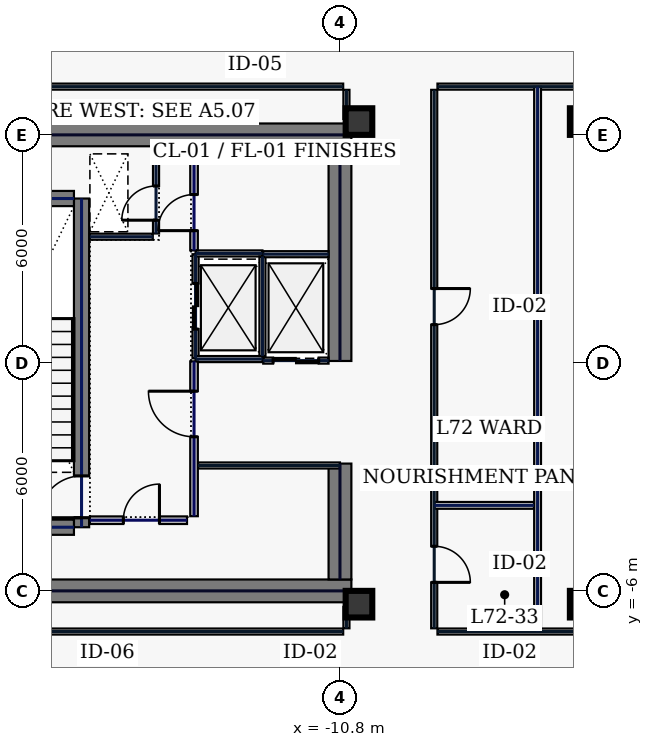
"""IFC4 building model, lengths in metres.
Left out: names, types, materials, properties, quantities, classifications, styles, units other than length and angle.
Written with IfcOpenShell. Run it as: python <this file> out.ifc"""

import sys

from ifc_helpers import new_model, si_unit, direction, frame, frame_2d, origin, origin_2d, place, context, subcontext, project, spatial, rectangle, hollow_rectangle, extrude, element, fill, save


model = new_model("IFC4")
c1 = context("Model", 3, precision=1e-05, world=origin(), true_north=direction((0.0, 1.0)))
c2 = subcontext(c1, "Body", "Model", "MODEL_VIEW")
j1 = project(units=[si_unit("LENGTHUNIT", "METRE"), si_unit("PLANEANGLEUNIT", "RADIAN")], contexts=[c1])
p1 = place(None, origin())
s1 = spatial("IfcSite", under=j1, at=p1, CompositionType="ELEMENT")
p2 = place(p1, origin())
s2 = spatial("IfcBuilding", under=s1, at=p2, CompositionType="ELEMENT")
p3 = place(p2, frame((0.0, 0.0, 309.0)))
s3 = spatial("IfcBuildingStorey", under=s2, at=p3, CompositionType="ELEMENT", Elevation=309.0)
for number, where, z_axis, x_axis in (
    (1, (-22.0, 6.0, 0.0), (0.0, 0.0, 1.0), (1.0, 0.0, 0.0)),
    (2, (-22.0, -6.0, 0.0), (0.0, 0.0, 1.0), (1.0, 0.0, 0.0)),
):
    element("IfcWall", number, at=place(p3, frame(where, z_axis=z_axis, x_axis=x_axis)), inside=s3, PredefinedType="SHEAR", context=c2, shape_type="SweptSolid", body=[
        extrude(rectangle(XDim=11.5, YDim=0.6, at=frame_2d((5.75, 0.0))), origin(), (0.0, 0.0, 1.0), 3.74),
    ])
p4 = place(p3, frame((-10.8, -5.7, 0.0), z_axis=(0.0, 0.0, 1.0), x_axis=(0.0, 1.0, 0.0)))
e3 = element("IfcWall", 3, at=p4, inside=s3, PredefinedType="SHEAR", context=c2, shape_type="SweptSolid", body=[
    extrude(rectangle(XDim=3.05, YDim=0.6, at=frame_2d((1.525, 0.0))), origin(), (0.0, 0.0, 1.0), 3.74),
])
p5 = place(p3, frame((-10.8, 0.05, 0.0), z_axis=(0.0, 0.0, 1.0), x_axis=(0.0, 1.0, 0.0)))
e4 = element("IfcWall", 4, at=p5, inside=s3, PredefinedType="SHEAR", context=c2, shape_type="SweptSolid", body=[
    extrude(rectangle(XDim=5.65, YDim=0.6, at=frame_2d((2.825, 0.0))), origin(), (0.0, 0.0, 1.0), 3.74),
])
p6 = place(p3, frame((-17.6, -4.325, 0.0), z_axis=(0.0, 0.0, 1.0), x_axis=(0.0, 1.0, 0.0)))
e5 = element("IfcWall", 5, at=p6, inside=s3, PredefinedType="SHEAR", context=c2, shape_type="SweptSolid", body=[
    extrude(rectangle(XDim=8.65, YDim=0.4, at=frame_2d((4.325, 0.0))), origin(), (0.0, 0.0, 1.0), 3.74),
])
p7 = place(p6, frame((0.25, 0.0, 0.0)))
e6 = element("IfcOpeningElement", 6, at=p7, cuts=e5, PredefinedType="OPENING", context=c2, shape_type="SweptSolid", body=[
    extrude(rectangle(XDim=1.1, YDim=2.2, at=frame_2d((0.55, 1.1))), frame((0.0, 0.21, 0.0), z_axis=(0.0, -1.0, 0.0), x_axis=(1.0, 0.0, 0.0)), (0.0, 0.0, 1.0), 0.42),
])
for number, where, z_axis, x_axis in (
    (7, (-21.2, -4.325, 0.0), (0.0, 0.0, 1.0), (1.0, 0.0, 0.0)),
    (8, (-21.2, 4.325, 0.0), (0.0, 0.0, 1.0), (1.0, 0.0, 0.0)),
):
    element("IfcWall", number, at=place(p3, frame(where, z_axis=z_axis, x_axis=x_axis)), inside=s3, PredefinedType="SHEAR", context=c2, shape_type="SweptSolid", body=[
        extrude(rectangle(XDim=3.4, YDim=0.4, at=frame_2d((1.7, 0.0))), origin(), (0.0, 0.0, 1.0), 3.74),
    ])
for number, where, z_axis, x_axis in (
    (9, (-10.3, -6.35, 0.0), (0.0, 0.0, 1.0), (1.0, 0.0, 0.0)),
    (10, (-10.3, 6.35, 0.0), (0.0, 0.0, 1.0), (1.0, 0.0, 0.0)),
    (11, (-4.4, -6.35, 0.0), (0.0, 0.0, 1.0), (1.0, 0.0, 0.0)),
    (12, (-4.4, 6.35, 0.0), (0.0, 0.0, 1.0), (1.0, 0.0, 0.0)),
):
    element("IfcColumn", number, at=place(p3, frame(where, z_axis=z_axis, x_axis=x_axis)), inside=s3, PredefinedType="COLUMN", context=c2, shape_type="SweptSolid", body=[
        extrude(hollow_rectangle(XDim=0.7, YDim=0.7, WallThickness=0.032, at=origin_2d()), origin(), (0.0, 0.0, 1.0), 3.74),
    ])
p8 = place(p3, frame((-14.6, 0.12, 0.0), z_axis=(0.0, 0.0, 1.0), x_axis=(0.0, 1.0, 0.0)))
e13 = element("IfcWall", 13, at=p8, inside=s3, PredefinedType="PARTITIONING", context=c2, shape_type="SweptSolid", body=[
    extrude(rectangle(XDim=2.74, YDim=0.16, at=frame_2d((1.37, 0.0))), origin(), (0.0, 0.0, 1.0), 3.74),
])
p9 = place(p8, frame((0.77, 0.0, 0.0)))
e14 = element("IfcOpeningElement", 14, at=p9, cuts=e13, PredefinedType="OPENING", context=c2, shape_type="SweptSolid", body=[
    extrude(rectangle(XDim=1.2, YDim=2.2, at=frame_2d((0.6, 1.1))), frame((0.0, 0.09, 0.0), z_axis=(0.0, -1.0, 0.0), x_axis=(1.0, 0.0, 0.0)), (0.0, 0.0, 1.0), 0.18),
])
for number, where, z_axis, x_axis in (
    (15, (-14.6, 0.1, 0.0), (0.0, 0.0, 1.0), (1.0, 0.0, 0.0)),
    (16, (-14.6, 2.88, 0.0), (0.0, 0.0, 1.0), (1.0, 0.0, 0.0)),
):
    element("IfcWall", number, at=place(p3, frame(where, z_axis=z_axis, x_axis=x_axis)), inside=s3, PredefinedType="PARTITIONING", context=c2, shape_type="SweptSolid", body=[
        extrude(rectangle(XDim=1.76, YDim=0.16, at=frame_2d((0.88, 0.0))), origin(), (0.0, 0.0, 1.0), 3.74),
    ])
p10 = place(p3, frame((-12.84, 0.18, 0.0), z_axis=(0.0, 0.0, 1.0), x_axis=(0.0, 1.0, 0.0)))
e17 = element("IfcWall", 17, at=p10, inside=s3, PredefinedType="PARTITIONING", context=c2, shape_type="SweptSolid", body=[
    extrude(rectangle(XDim=2.62, YDim=0.16, at=frame_2d((1.31, 0.0))), origin(), (0.0, 0.0, 1.0), 3.74),
])
p11 = place(p3, frame((-12.82, 0.06, 0.0), z_axis=(0.0, 0.0, 1.0), x_axis=(1.0, 0.0, 0.0)))
e18 = element("IfcWall", 18, at=p11, inside=s3, PredefinedType="PARTITIONING", context=c2, shape_type="SweptSolid", body=[
    extrude(rectangle(XDim=1.72, YDim=0.16, at=frame_2d((0.86, 0.0))), origin(), (0.0, 0.0, 1.0), 3.74),
])
p12 = place(p11, frame((0.26, 0.0, 0.0)))
e19 = element("IfcOpeningElement", 19, at=p12, cuts=e18, PredefinedType="OPENING", context=c2, shape_type="SweptSolid", body=[
    extrude(rectangle(XDim=1.2, YDim=2.2, at=frame_2d((0.6, 1.1))), frame((0.0, 0.09, 0.0), z_axis=(0.0, -1.0, 0.0), x_axis=(1.0, 0.0, 0.0)), (0.0, 0.0, 1.0), 0.18),
])
p13 = place(p3, frame((-12.82, 2.86, 0.0), z_axis=(0.0, 0.0, 1.0), x_axis=(1.0, 0.0, 0.0)))
e20 = element("IfcWall", 20, at=p13, inside=s3, PredefinedType="PARTITIONING", context=c2, shape_type="SweptSolid", body=[
    extrude(rectangle(XDim=1.72, YDim=0.16, at=frame_2d((0.86, 0.0))), origin(), (0.0, 0.0, 1.0), 3.74),
])
p14 = place(p3, frame((-15.64, 3.405, 0.0), z_axis=(0.0, 0.0, 1.0), x_axis=(0.0, 1.0, 0.0)))
e21 = element("IfcWall", 21, at=p14, inside=s3, PredefinedType="PARTITIONING", context=c2, shape_type="SweptSolid", body=[
    extrude(rectangle(XDim=2.155, YDim=0.16, at=frame_2d((1.078, 0.0))), origin(), (0.0, 0.0, 1.0), 3.74),
])
p15 = place(p14, frame((0.35, 0.0, 0.0)))
e22 = element("IfcOpeningElement", 22, at=p15, cuts=e21, PredefinedType="OPENING", context=c2, shape_type="SweptSolid", body=[
    extrude(rectangle(XDim=0.9, YDim=2.2, at=frame_2d((0.45, 1.1))), frame((0.0, 0.09, 0.0), z_axis=(0.0, -1.0, 0.0), x_axis=(1.0, 0.0, 0.0)), (0.0, 0.0, 1.0), 0.18),
])
p16 = place(p3, frame((-17.38, 3.32, 0.0), z_axis=(0.0, 0.0, 1.0), x_axis=(1.0, 0.0, 0.0)))
e23 = element("IfcWall", 23, at=p16, inside=s3, PredefinedType="PARTITIONING", context=c2, shape_type="SweptSolid", body=[
    extrude(rectangle(XDim=1.655, YDim=0.16, at=frame_2d((0.827, 0.0))), origin(), (0.0, 0.0, 1.0), 3.74),
])
p17 = place(p3, frame((-17.38, -4.14, 0.0), z_axis=(0.0, 0.0, 1.0), x_axis=(1.0, 0.0, 0.0)))
e24 = element("IfcWall", 24, at=p17, inside=s3, PredefinedType="SOLIDWALL", context=c2, shape_type="SweptSolid", body=[
    extrude(rectangle(XDim=2.555, YDim=0.2, at=frame_2d((1.277, 0.0))), origin(), (0.0, 0.0, 1.0), 3.74),
])
p18 = place(p17, frame((0.88, 0.0, 0.0)))
e25 = element("IfcOpeningElement", 25, at=p18, cuts=e24, PredefinedType="OPENING", context=c2, shape_type="SweptSolid", body=[
    extrude(rectangle(XDim=0.95, YDim=2.2, at=frame_2d((0.475, 1.1))), frame((0.0, 0.11, 0.0), z_axis=(0.0, -1.0, 0.0), x_axis=(1.0, 0.0, 0.0)), (0.0, 0.0, 1.0), 0.22),
])
p19 = place(p3, frame((-14.535, -2.7, 0.0), z_axis=(0.0, 0.0, 1.0), x_axis=(1.0, 0.0, 0.0)))
e26 = element("IfcWall", 26, at=p19, inside=s3, PredefinedType="PARTITIONING", context=c2, shape_type="SweptSolid", body=[
    extrude(rectangle(XDim=3.735, YDim=0.16, at=frame_2d((1.867, 0.0))), origin(), (0.0, 0.0, 1.0), 3.74),
])
p20 = place(p3, frame((-14.64, 2.96, 0.0), z_axis=(0.0, 0.0, 1.0), x_axis=(0.0, 1.0, 0.0)))
e27 = element("IfcWall", 27, at=p20, inside=s3, PredefinedType="SOLIDWALL", context=c2, shape_type="SweptSolid", body=[
    extrude(rectangle(XDim=2.6, YDim=0.2, at=frame_2d((1.3, 0.0))), origin(), (0.0, 0.0, 1.0), 3.74),
])
p21 = place(p20, frame((0.52, 0.0, 0.0)))
e28 = element("IfcOpeningElement", 28, at=p21, cuts=e27, PredefinedType="OPENING", context=c2, shape_type="SweptSolid", body=[
    extrude(rectangle(XDim=0.95, YDim=2.2, at=frame_2d((0.475, 1.1))), frame((0.0, 0.11, 0.0), z_axis=(0.0, -1.0, 0.0), x_axis=(1.0, 0.0, 0.0)), (0.0, 0.0, 1.0), 0.22),
])
p22 = place(p3, frame((-14.64, -4.035, 0.0), z_axis=(0.0, 0.0, 1.0), x_axis=(0.0, 1.0, 0.0)))
e29 = element("IfcWall", 29, at=p22, inside=s3, PredefinedType="SOLIDWALL", context=c2, shape_type="SweptSolid", body=[
    extrude(rectangle(XDim=4.075, YDim=0.2, at=frame_2d((2.038, 0.0))), origin(), (0.0, 0.0, 1.0), 3.74),
])
p23 = place(p22, frame((2.09, 0.0, 0.0)))
e30 = element("IfcOpeningElement", 30, at=p23, cuts=e29, PredefinedType="OPENING", context=c2, shape_type="SweptSolid", body=[
    extrude(rectangle(XDim=1.2, YDim=2.2, at=frame_2d((0.6, 1.1))), frame((0.0, 0.11, 0.0), z_axis=(0.0, -1.0, 0.0), x_axis=(1.0, 0.0, 0.0)), (0.0, 0.0, 1.0), 0.22),
])
p24 = place(p3, frame((-3.965, 7.27, 0.0), z_axis=(0.0, 0.0, 1.0), x_axis=(-1.0, 0.0, 0.0)))
e31 = element("IfcWall", 31, at=p24, inside=s3, PredefinedType="PARTITIONING", context=c2, shape_type="SweptSolid", body=[
    extrude(rectangle(XDim=4.27, YDim=0.16, at=frame_2d((2.135, 0.0))), origin(), (0.0, 0.0, 1.0), 3.74),
])
p25 = place(p3, frame((-8.32, 7.185, 0.0), z_axis=(0.0, 0.0, 1.0), x_axis=(0.0, -1.0, 0.0)))
e32 = element("IfcWall", 32, at=p25, inside=s3, PredefinedType="PARTITIONING", context=c2, shape_type="SweptSolid", body=[
    extrude(rectangle(XDim=14.17, YDim=0.16, at=frame_2d((7.085, 0.0))), origin(), (0.0, 0.0, 1.0), 3.74),
])
p26 = place(p25, frame((12.011, 0.0, 0.0)))
e33 = element("IfcOpeningElement", 33, at=p26, cuts=e32, PredefinedType="OPENING", context=c2, shape_type="SweptSolid", body=[
    extrude(rectangle(XDim=0.95, YDim=2.2, at=frame_2d((0.475, 1.1))), frame((0.0, 0.09, 0.0), z_axis=(0.0, -1.0, 0.0), x_axis=(1.0, 0.0, 0.0)), (0.0, 0.0, 1.0), 0.18),
])
p27 = place(p25, frame((5.229, 0.0, 0.0)))
e34 = element("IfcOpeningElement", 34, at=p27, cuts=e32, PredefinedType="OPENING", context=c2, shape_type="SweptSolid", body=[
    extrude(rectangle(XDim=0.95, YDim=2.2, at=frame_2d((0.475, 1.1))), frame((0.0, 0.09, 0.0), z_axis=(0.0, -1.0, 0.0), x_axis=(1.0, 0.0, 0.0)), (0.0, 0.0, 1.0), 0.18),
])
p28 = place(p3, frame((-8.235, -7.07, 0.0), z_axis=(0.0, 0.0, 1.0), x_axis=(1.0, 0.0, 0.0)))
e35 = element("IfcWall", 35, at=p28, inside=s3, PredefinedType="PARTITIONING", context=c2, shape_type="SweptSolid", body=[
    extrude(rectangle(XDim=4.27, YDim=0.16, at=frame_2d((2.135, 0.0))), origin(), (0.0, 0.0, 1.0), 3.74),
])
p29 = place(p3, frame((-10.63, -6.985, 0.0), z_axis=(0.0, 0.0, 1.0), x_axis=(0.0, 1.0, 0.0)))
e36 = element("IfcWall", 36, at=p29, inside=s3, PredefinedType="PARTITIONING", context=c2, shape_type="SweptSolid", body=[
    extrude(rectangle(XDim=0.565, YDim=0.16, at=frame_2d((0.283, 0.0))), origin(), (0.0, 0.0, 1.0), 3.74),
])
p30 = place(p3, frame((-10.63, 6.42, 0.0), z_axis=(0.0, 0.0, 1.0), x_axis=(0.0, 1.0, 0.0)))
e37 = element("IfcWall", 37, at=p30, inside=s3, PredefinedType="PARTITIONING", context=c2, shape_type="SweptSolid", body=[
    extrude(rectangle(XDim=0.765, YDim=0.16, at=frame_2d((0.383, 0.0))), origin(), (0.0, 0.0, 1.0), 3.74),
])
for number, where, z_axis, x_axis in (
    (38, (-10.715, 7.27, 0.0), (0.0, 0.0, 1.0), (-1.0, 0.0, 0.0)),
    (39, (-21.915, -7.07, 0.0), (0.0, 0.0, 1.0), (1.0, 0.0, 0.0)),
):
    element("IfcWall", number, at=place(p3, frame(where, z_axis=z_axis, x_axis=x_axis)), inside=s3, PredefinedType="PARTITIONING", context=c2, shape_type="SweptSolid", body=[
        extrude(rectangle(XDim=11.2, YDim=0.16, at=frame_2d((5.6, 0.0))), origin(), (0.0, 0.0, 1.0), 3.74),
    ])
p31 = place(p3, frame((-5.6, -7.065, 0.0), z_axis=(0.0, 0.0, 1.0), x_axis=(0.0, 1.0, 0.0)))
e40 = element("IfcWall", 40, at=p31, inside=s3, PredefinedType="PARTITIONING", context=c2, shape_type="SweptSolid", body=[
    extrude(rectangle(XDim=14.33, YDim=0.18, at=frame_2d((7.165, 0.0))), origin(), (0.0, 0.0, 1.0), 3.74),
])
p32 = place(p3, frame((-8.315, -3.75, 0.0), z_axis=(0.0, 0.0, 1.0), x_axis=(1.0, 0.0, 0.0)))
e41 = element("IfcWall", 41, at=p32, inside=s3, PredefinedType="PARTITIONING", context=c2, shape_type="SweptSolid", body=[
    extrude(rectangle(XDim=2.62, YDim=0.18, at=frame_2d((1.31, 0.0))), origin(), (0.0, 0.0, 1.0), 3.74),
])
p33 = place(p7, origin())
e42 = element("IfcDoor", 42, at=p33, inside=s3, OperationType="SINGLE_SWING_LEFT", PredefinedType="DOOR", context=c2, shape_type="SweptSolid", body=[
    extrude(rectangle(XDim=1.1, YDim=2.2, at=frame_2d((0.55, 1.1))), frame((0.0, 0.025, 0.0), z_axis=(0.0, -1.0, 0.0), x_axis=(1.0, 0.0, 0.0)), (0.0, 0.0, 1.0), 0.05),
])
fill(e6, e42)
p34 = place(p9, origin())
e43 = element("IfcDoor", 43, at=p34, inside=s3, OperationType="SLIDING_TO_LEFT", PredefinedType="DOOR", context=c2, shape_type="SweptSolid", body=[
    extrude(rectangle(XDim=1.2, YDim=2.2, at=frame_2d((0.6, 1.1))), frame((0.0, 0.025, 0.0), z_axis=(0.0, -1.0, 0.0), x_axis=(1.0, 0.0, 0.0)), (0.0, 0.0, 1.0), 0.05),
])
fill(e14, e43)
p35 = place(p12, origin())
e44 = element("IfcDoor", 44, at=p35, inside=s3, OperationType="SLIDING_TO_LEFT", PredefinedType="DOOR", context=c2, shape_type="SweptSolid", body=[
    extrude(rectangle(XDim=1.2, YDim=2.2, at=frame_2d((0.6, 1.1))), frame((0.0, 0.025, 0.0), z_axis=(0.0, -1.0, 0.0), x_axis=(1.0, 0.0, 0.0)), (0.0, 0.0, 1.0), 0.05),
])
fill(e19, e44)
p36 = place(p15, origin())
e45 = element("IfcDoor", 45, at=p36, inside=s3, OperationType="SINGLE_SWING_LEFT", PredefinedType="DOOR", context=c2, shape_type="SweptSolid", body=[
    extrude(rectangle(XDim=0.9, YDim=2.2, at=frame_2d((0.45, 1.1))), frame((0.0, 0.025, 0.0), z_axis=(0.0, -1.0, 0.0), x_axis=(1.0, 0.0, 0.0)), (0.0, 0.0, 1.0), 0.05),
])
fill(e22, e45)
p37 = place(p18, origin())
e46 = element("IfcDoor", 46, at=p37, inside=s3, OperationType="SINGLE_SWING_RIGHT", PredefinedType="DOOR", context=c2, shape_type="SweptSolid", body=[
    extrude(rectangle(XDim=0.95, YDim=2.2, at=frame_2d((0.475, 1.1))), frame((0.0, 0.025, 0.0), z_axis=(0.0, -1.0, 0.0), x_axis=(1.0, 0.0, 0.0)), (0.0, 0.0, 1.0), 0.05),
])
fill(e25, e46)
p38 = place(p21, origin())
e47 = element("IfcDoor", 47, at=p38, inside=s3, OperationType="SINGLE_SWING_LEFT", PredefinedType="DOOR", context=c2, shape_type="SweptSolid", body=[
    extrude(rectangle(XDim=0.95, YDim=2.2, at=frame_2d((0.475, 1.1))), frame((0.0, 0.025, 0.0), z_axis=(0.0, -1.0, 0.0), x_axis=(1.0, 0.0, 0.0)), (0.0, 0.0, 1.0), 0.05),
])
fill(e28, e47)
p39 = place(p23, origin())
e48 = element("IfcDoor", 48, at=p39, inside=s3, OperationType="SINGLE_SWING_RIGHT", PredefinedType="DOOR", context=c2, shape_type="SweptSolid", body=[
    extrude(rectangle(XDim=1.2, YDim=2.2, at=frame_2d((0.6, 1.1))), frame((0.0, 0.025, 0.0), z_axis=(0.0, -1.0, 0.0), x_axis=(1.0, 0.0, 0.0)), (0.0, 0.0, 1.0), 0.05),
])
fill(e30, e48)
p40 = place(p26, origin())
e49 = element("IfcDoor", 49, at=p40, inside=s3, OperationType="SINGLE_SWING_RIGHT", PredefinedType="DOOR", context=c2, shape_type="SweptSolid", body=[
    extrude(rectangle(XDim=0.95, YDim=2.2, at=frame_2d((0.475, 1.1))), frame((0.0, 0.025, 0.0), z_axis=(0.0, -1.0, 0.0), x_axis=(1.0, 0.0, 0.0)), (0.0, 0.0, 1.0), 0.05),
])
fill(e33, e49)
p41 = place(p27, origin())
e50 = element("IfcDoor", 50, at=p41, inside=s3, OperationType="SINGLE_SWING_LEFT", PredefinedType="DOOR", context=c2, shape_type="SweptSolid", body=[
    extrude(rectangle(XDim=0.95, YDim=2.2, at=frame_2d((0.475, 1.1))), frame((0.0, 0.025, 0.0), z_axis=(0.0, -1.0, 0.0), x_axis=(1.0, 0.0, 0.0)), (0.0, 0.0, 1.0), 0.05),
])
fill(e34, e50)
save(model, sys.argv[1])
